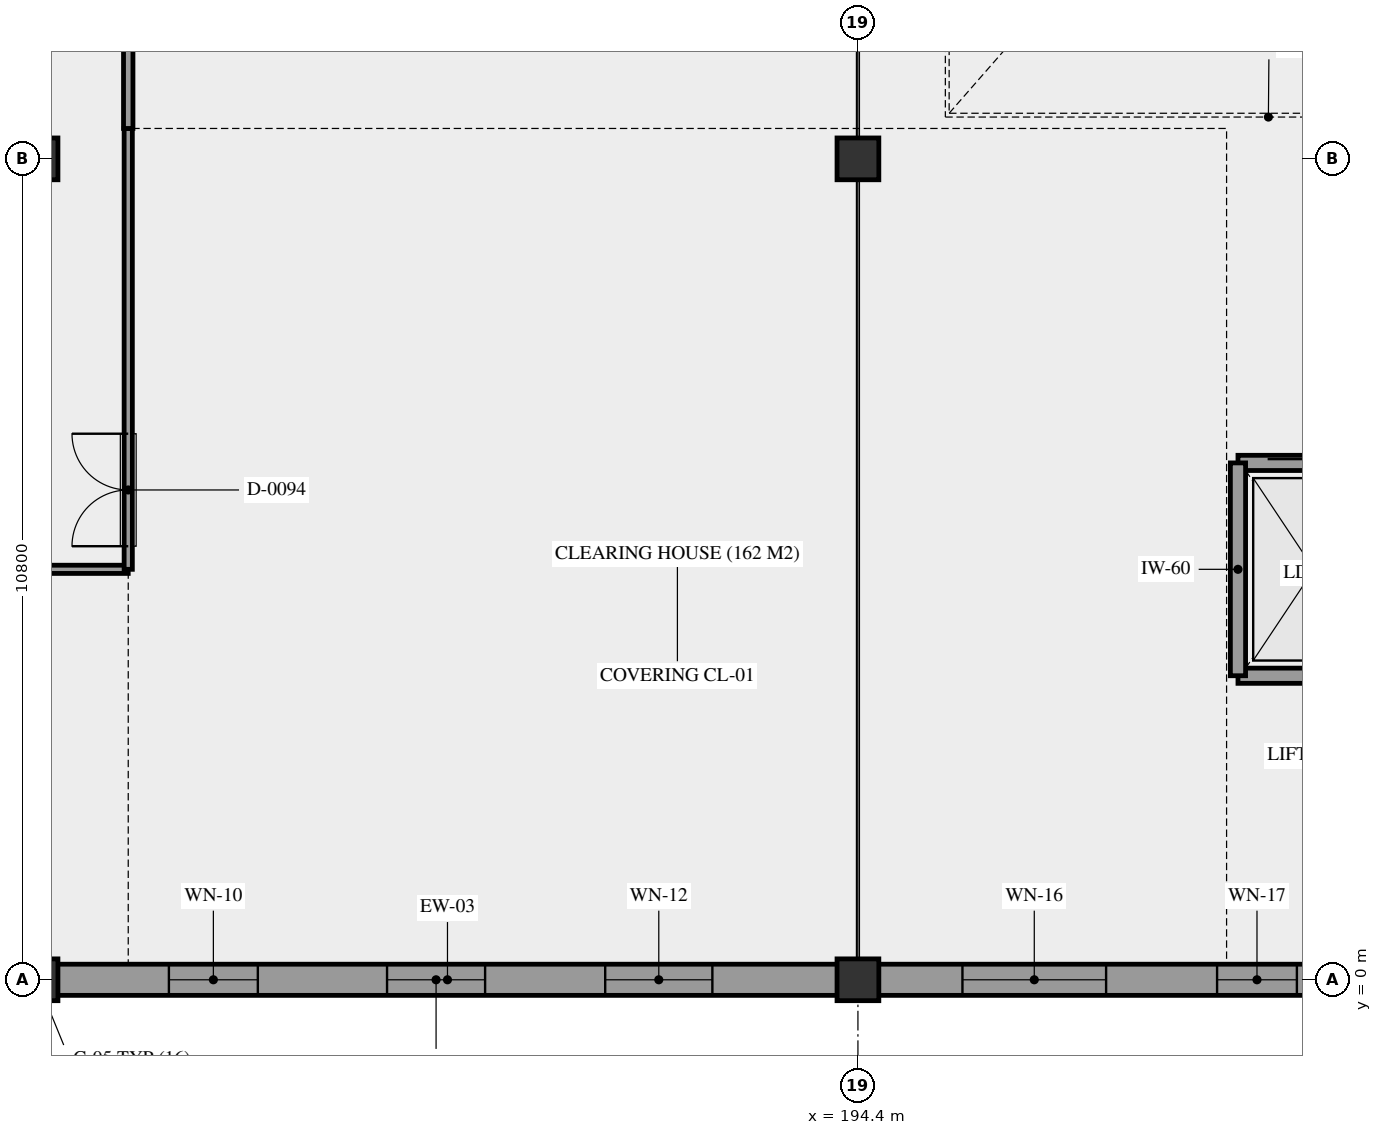
"""IFC4 building model, lengths in metres.
Left out: names, types, materials, properties, quantities, classifications, styles, units other than length and angle.
Written with IfcOpenShell. Run it as: python <this file> out.ifc"""

import sys

from ifc_helpers import new_model, si_unit, direction, frame, frame_2d, origin, origin_2d, place, context, subcontext, project, spatial, rectangle, extrude, element, fill, save


model = new_model("IFC4")
c1 = context("Model", 3, precision=1e-05, world=origin(), true_north=direction((0.0, 1.0)))
c2 = subcontext(c1, "Body", "Model", "MODEL_VIEW")
j1 = project(units=[si_unit("LENGTHUNIT", "METRE"), si_unit("PLANEANGLEUNIT", "RADIAN")], contexts=[c1])
p1 = place(None, origin())
s1 = spatial("IfcSite", under=j1, at=p1, CompositionType="ELEMENT")
p2 = place(p1, origin())
s2 = spatial("IfcBuilding", under=s1, at=p2, CompositionType="ELEMENT")
p3 = place(p2, frame((0.0, 0.0, 10.08)))
s3 = spatial("IfcBuildingStorey", under=s2, at=p3, CompositionType="ELEMENT", Elevation=10.08)
for number, where, z_axis, x_axis in (
    (1, (183.6, 0.0, 0.0), (0.0, 0.0, 1.0), (1.0, 0.0, 0.0)),
    (2, (183.6, 10.8, 0.0), (0.0, 0.0, 1.0), (1.0, 0.0, 0.0)),
    (3, (194.4, 0.0, 0.0), (0.0, 0.0, 1.0), (1.0, 0.0, 0.0)),
    (4, (194.4, 10.8, 0.0), (0.0, 0.0, 1.0), (1.0, 0.0, 0.0)),
):
    element("IfcColumn", number, at=place(p3, frame(where, z_axis=z_axis, x_axis=x_axis)), inside=s3, PredefinedType="COLUMN", context=c2, shape_type="SweptSolid", body=[
        extrude(rectangle(XDim=0.55, YDim=0.55, at=origin_2d()), origin(), (0.0, 0.0, 1.0), 4.68),
    ])
p4 = place(p3, frame((183.87, 0.0, 0.0), z_axis=(0.0, 0.0, 1.0), x_axis=(1.0, 0.0, 0.0)))
e5 = element("IfcWall", 5, at=p4, inside=s3, PredefinedType="STANDARD", context=c2, shape_type="SweptSolid", body=[
    extrude(rectangle(XDim=10.26, YDim=0.41, at=frame_2d((5.13, 0.0))), origin(), (0.0, 0.0, 1.0), 3.53),
])
p5 = place(p4, frame((1.465, 0.0, 0.95)))
e6 = element("IfcOpeningElement", 6, at=p5, cuts=e5, PredefinedType="OPENING", context=c2, shape_type="SweptSolid", body=[
    extrude(rectangle(XDim=1.17, YDim=1.05, at=frame_2d((0.585, 0.525))), frame((0.0, 0.215, 0.0), z_axis=(0.0, -1.0, 0.0), x_axis=(1.0, 0.0, 0.0)), (0.0, 0.0, 1.0), 0.43),
])
p6 = place(p4, frame((4.335, 0.0, 0.95)))
e7 = element("IfcOpeningElement", 7, at=p6, cuts=e5, PredefinedType="OPENING", context=c2, shape_type="SweptSolid", body=[
    extrude(rectangle(XDim=1.29, YDim=1.05, at=frame_2d((0.645, 0.525))), frame((0.0, 0.215, 0.0), z_axis=(0.0, -1.0, 0.0), x_axis=(1.0, 0.0, 0.0)), (0.0, 0.0, 1.0), 0.43),
])
p7 = place(p4, frame((7.205, 0.0, 0.95)))
e8 = element("IfcOpeningElement", 8, at=p7, cuts=e5, PredefinedType="OPENING", context=c2, shape_type="SweptSolid", body=[
    extrude(rectangle(XDim=1.41, YDim=1.05, at=frame_2d((0.705, 0.525))), frame((0.0, 0.215, 0.0), z_axis=(0.0, -1.0, 0.0), x_axis=(1.0, 0.0, 0.0)), (0.0, 0.0, 1.0), 0.43),
])
p8 = place(p3, frame((194.67, 0.0, 0.0), z_axis=(0.0, 0.0, 1.0), x_axis=(1.0, 0.0, 0.0)))
e9 = element("IfcWall", 9, at=p8, inside=s3, PredefinedType="STANDARD", context=c2, shape_type="SweptSolid", body=[
    extrude(rectangle(XDim=10.26, YDim=0.41, at=frame_2d((5.13, 0.0))), origin(), (0.0, 0.0, 1.0), 3.53),
])
p9 = place(p8, frame((1.105, 0.0, 0.95)))
e10 = element("IfcOpeningElement", 10, at=p9, cuts=e9, PredefinedType="OPENING", context=c2, shape_type="SweptSolid", body=[
    extrude(rectangle(XDim=1.89, YDim=1.05, at=frame_2d((0.945, 0.525))), frame((0.0, 0.215, 0.0), z_axis=(0.0, -1.0, 0.0), x_axis=(1.0, 0.0, 0.0)), (0.0, 0.0, 1.0), 0.43),
])
p10 = place(p8, frame((4.455, 0.0, 0.95)))
e11 = element("IfcOpeningElement", 11, at=p10, cuts=e9, PredefinedType="OPENING", context=c2, shape_type="SweptSolid", body=[
    extrude(rectangle(XDim=1.05, YDim=1.2, at=frame_2d((0.525, 0.6))), frame((0.0, 0.215, 0.0), z_axis=(0.0, -1.0, 0.0), x_axis=(1.0, 0.0, 0.0)), (0.0, 0.0, 1.0), 0.43),
])
p11 = place(p8, frame((7.325, 0.0, 0.95)))
e12 = element("IfcOpeningElement", 12, at=p11, cuts=e9, PredefinedType="OPENING", context=c2, shape_type="SweptSolid", body=[
    extrude(rectangle(XDim=1.17, YDim=1.2, at=frame_2d((0.585, 0.6))), frame((0.0, 0.215, 0.0), z_axis=(0.0, -1.0, 0.0), x_axis=(1.0, 0.0, 0.0)), (0.0, 0.0, 1.0), 0.43),
])
p12 = place(p3, frame((199.4, 4.0, 0.0), z_axis=(0.0, 0.0, 1.0), x_axis=(1.0, 0.0, 0.0)))
e13 = element("IfcWall", 13, at=p12, inside=s3, PredefinedType="SOLIDWALL", context=c2, shape_type="SweptSolid", body=[
    extrude(rectangle(XDim=2.0, YDim=0.2, at=frame_2d((1.0, 0.0))), origin(), (0.0, 0.0, 1.0), 3.5),
])
p13 = place(p3, frame((199.4, 6.8, 0.0), z_axis=(0.0, 0.0, 1.0), x_axis=(1.0, 0.0, 0.0)))
e14 = element("IfcWall", 14, at=p13, inside=s3, PredefinedType="SOLIDWALL", context=c2, shape_type="SweptSolid", body=[
    extrude(rectangle(XDim=2.0, YDim=0.2, at=frame_2d((1.0, 0.0))), origin(), (0.0, 0.0, 1.0), 3.5),
])
p14 = place(p13, frame((0.39, 0.0, 0.0)))
e15 = element("IfcOpeningElement", 15, at=p14, cuts=e14, PredefinedType="OPENING", context=c2, shape_type="SweptSolid", body=[
    extrude(rectangle(XDim=1.22, YDim=2.2, at=frame_2d((0.61, 1.1))), frame((0.0, 0.11, 0.0), z_axis=(0.0, -1.0, 0.0), x_axis=(1.0, 0.0, 0.0)), (0.0, 0.0, 1.0), 0.22),
])
p15 = place(p3, frame((199.4, 4.0, 0.0), z_axis=(0.0, 0.0, 1.0), x_axis=(0.0, 1.0, 0.0)))
e16 = element("IfcWall", 16, at=p15, inside=s3, PredefinedType="SOLIDWALL", context=c2, shape_type="SweptSolid", body=[
    extrude(rectangle(XDim=2.8, YDim=0.2, at=frame_2d((1.4, 0.0))), origin(), (0.0, 0.0, 1.0), 3.5),
])
p16 = place(p3, frame((182.67, 5.4, 0.0), z_axis=(0.0, 0.0, 1.0), x_axis=(1.0, 0.0, 0.0)))
e17 = element("IfcWall", 17, at=p16, inside=s3, PredefinedType="PARTITIONING", context=c2, shape_type="SweptSolid", body=[
    extrude(rectangle(XDim=2.13, YDim=0.108, at=frame_2d((1.065, 0.0))), origin(), (0.0, 0.0, 1.0), 3.23),
])
p17 = place(p3, frame((184.8, 5.4, 0.0), z_axis=(0.0, 0.0, 1.0), x_axis=(0.0, 1.0, 0.0)))
e18 = element("IfcWall", 18, at=p17, inside=s3, PredefinedType="PARTITIONING", context=c2, shape_type="SweptSolid", body=[
    extrude(rectangle(XDim=5.8, YDim=0.108, at=frame_2d((2.9, 0.0))), origin(), (0.0, 0.0, 1.0), 3.23),
])
p18 = place(p17, frame((0.304, 0.0, 0.0)))
e19 = element("IfcOpeningElement", 19, at=p18, cuts=e18, PredefinedType="OPENING", context=c2, shape_type="SweptSolid", body=[
    extrude(rectangle(XDim=1.48, YDim=2.2, at=frame_2d((0.74, 1.1))), frame((0.0, 0.064, 0.0), z_axis=(0.0, -1.0, 0.0), x_axis=(1.0, 0.0, 0.0)), (0.0, 0.0, 1.0), 0.128),
])
p19 = place(p3, frame((184.8, 11.2, 0.0), z_axis=(0.0, 0.0, 1.0), x_axis=(0.0, 1.0, 0.0)))
e20 = element("IfcWall", 20, at=p19, inside=s3, PredefinedType="PARTITIONING", context=c2, shape_type="SweptSolid", body=[
    extrude(rectangle(XDim=6.0, YDim=0.124, at=frame_2d((3.0, 0.0))), origin(), (0.0, 0.0, 1.0), 3.23),
])
p20 = place(p5, frame((1.17, 0.0, 0.0), z_axis=(0.0, 0.0, 1.0), x_axis=(-1.0, 0.0, 0.0)))
e21 = element("IfcWindow", 21, at=p20, inside=s3, PartitioningType="SINGLE_PANEL", PredefinedType="WINDOW", context=c2, shape_type="SweptSolid", body=[
    extrude(rectangle(XDim=1.17, YDim=1.05, at=frame_2d((0.585, 0.525))), frame((0.0, 0.03, 0.0), z_axis=(0.0, -1.0, 0.0), x_axis=(1.0, 0.0, 0.0)), (0.0, 0.0, 1.0), 0.06),
])
fill(e6, e21)
p21 = place(p6, frame((1.29, 0.0, 0.0), z_axis=(0.0, 0.0, 1.0), x_axis=(-1.0, 0.0, 0.0)))
e22 = element("IfcWindow", 22, at=p21, inside=s3, PartitioningType="SINGLE_PANEL", PredefinedType="WINDOW", context=c2, shape_type="SweptSolid", body=[
    extrude(rectangle(XDim=1.29, YDim=1.05, at=frame_2d((0.645, 0.525))), frame((0.0, 0.03, 0.0), z_axis=(0.0, -1.0, 0.0), x_axis=(1.0, 0.0, 0.0)), (0.0, 0.0, 1.0), 0.06),
])
fill(e7, e22)
p22 = place(p7, frame((1.41, 0.0, 0.0), z_axis=(0.0, 0.0, 1.0), x_axis=(-1.0, 0.0, 0.0)))
e23 = element("IfcWindow", 23, at=p22, inside=s3, PartitioningType="SINGLE_PANEL", PredefinedType="WINDOW", context=c2, shape_type="SweptSolid", body=[
    extrude(rectangle(XDim=1.41, YDim=1.05, at=frame_2d((0.705, 0.525))), frame((0.0, 0.03, 0.0), z_axis=(0.0, -1.0, 0.0), x_axis=(1.0, 0.0, 0.0)), (0.0, 0.0, 1.0), 0.06),
])
fill(e8, e23)
p23 = place(p9, frame((1.89, 0.0, 0.0), z_axis=(0.0, 0.0, 1.0), x_axis=(-1.0, 0.0, 0.0)))
e24 = element("IfcWindow", 24, at=p23, inside=s3, PartitioningType="SINGLE_PANEL", PredefinedType="WINDOW", context=c2, shape_type="SweptSolid", body=[
    extrude(rectangle(XDim=1.89, YDim=1.05, at=frame_2d((0.945, 0.525))), frame((0.0, 0.03, 0.0), z_axis=(0.0, -1.0, 0.0), x_axis=(1.0, 0.0, 0.0)), (0.0, 0.0, 1.0), 0.06),
])
fill(e10, e24)
p24 = place(p10, frame((1.05, 0.0, 0.0), z_axis=(0.0, 0.0, 1.0), x_axis=(-1.0, 0.0, 0.0)))
e25 = element("IfcWindow", 25, at=p24, inside=s3, PartitioningType="SINGLE_PANEL", PredefinedType="WINDOW", context=c2, shape_type="SweptSolid", body=[
    extrude(rectangle(XDim=1.05, YDim=1.2, at=frame_2d((0.525, 0.6))), frame((0.0, 0.03, 0.0), z_axis=(0.0, -1.0, 0.0), x_axis=(1.0, 0.0, 0.0)), (0.0, 0.0, 1.0), 0.06),
])
fill(e11, e25)
p25 = place(p14, origin())
e26 = element("IfcDoor", 26, at=p25, inside=s3, OperationType="DOUBLE_DOOR_SLIDING", PredefinedType="DOOR", context=c2, shape_type="SweptSolid", body=[
    extrude(rectangle(XDim=1.22, YDim=2.2, at=frame_2d((0.61, 1.1))), frame((0.0, 0.025, 0.0), z_axis=(0.0, -1.0, 0.0), x_axis=(1.0, 0.0, 0.0)), (0.0, 0.0, 1.0), 0.05),
])
fill(e15, e26)
p26 = place(p18, origin())
e27 = element("IfcDoor", 27, at=p26, inside=s3, OperationType="DOUBLE_DOOR_SINGLE_SWING", PredefinedType="DOOR", context=c2, shape_type="SweptSolid", body=[
    extrude(rectangle(XDim=1.48, YDim=2.2, at=frame_2d((0.74, 1.1))), frame((0.0, 0.025, 0.0), z_axis=(0.0, -1.0, 0.0), x_axis=(1.0, 0.0, 0.0)), (0.0, 0.0, 1.0), 0.05),
])
fill(e19, e27)
save(model, sys.argv[1])
